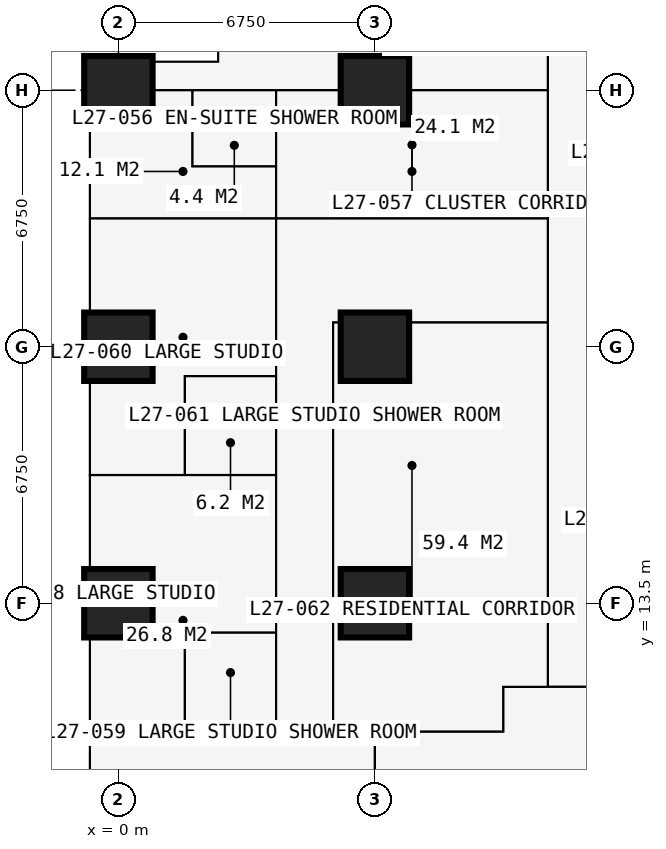
"""IFC4 building model, lengths in metres.
Left out: names, types, materials, properties, quantities, classifications, styles, units other than length and angle.
Written with IfcOpenShell. Run it as: python <this file> out.ifc"""

import sys

from ifc_helpers import new_model, si_unit, direction, frame, frame_2d, origin, origin_2d, place, context, subcontext, project, spatial, rectangle, extrude, element, fill, save


model = new_model("IFC4")
c1 = context("Model", 3, precision=1e-05, world=origin(), true_north=direction((0.0, 1.0)))
c2 = subcontext(c1, "Body", "Model", "MODEL_VIEW")
j1 = project(units=[si_unit("LENGTHUNIT", "METRE"), si_unit("PLANEANGLEUNIT", "RADIAN")], contexts=[c1])
p1 = place(None, origin())
s1 = spatial("IfcSite", under=j1, at=p1, CompositionType="ELEMENT")
p2 = place(p1, origin())
s2 = spatial("IfcBuilding", under=s1, at=p2, CompositionType="ELEMENT")
p3 = place(p2, frame((0.0, 0.0, 101.7)))
s3 = spatial("IfcBuildingStorey", under=s2, at=p3, CompositionType="ELEMENT", Elevation=101.7)
for number, where, z_axis, x_axis in (
    (1, (0.0, 13.5, 0.0), (0.0, 0.0, 1.0), (1.0, 0.0, 0.0)),
    (2, (0.0, 20.25, 0.0), (0.0, 0.0, 1.0), (1.0, 0.0, 0.0)),
    (3, (0.0, 27.0, 0.0), (0.0, 0.0, 1.0), (1.0, 0.0, 0.0)),
    (4, (6.75, 13.5, 0.0), (0.0, 0.0, 1.0), (1.0, 0.0, 0.0)),
    (5, (6.75, 20.25, 0.0), (0.0, 0.0, 1.0), (1.0, 0.0, 0.0)),
    (6, (6.75, 27.0, 0.0), (0.0, 0.0, 1.0), (1.0, 0.0, 0.0)),
):
    element("IfcColumn", number, at=place(p3, frame(where, z_axis=z_axis, x_axis=x_axis)), inside=s3, PredefinedType="COLUMN", context=c2, shape_type="SweptSolid", body=[
        extrude(rectangle(XDim=1.8, YDim=1.8, at=origin_2d()), origin(), (0.0, 0.0, 1.0), 3.6),
    ])
p4 = place(p3, frame((2.625, 31.125, 0.0), z_axis=(0.0, 0.0, 1.0), x_axis=(0.0, -1.0, 0.0)))
e7 = element("IfcWall", 7, at=p4, inside=s3, PredefinedType="SOLIDWALL", context=c2, shape_type="SweptSolid", body=[
    extrude(rectangle(XDim=3.375, YDim=0.3, at=frame_2d((1.688, 0.0))), origin(), (0.0, 0.0, 1.0), 3.375),
])
p5 = place(p4, frame((0.788, 0.0, 0.6)))
e8 = element("IfcOpeningElement", 8, at=p5, cuts=e7, PredefinedType="OPENING", context=c2, shape_type="SweptSolid", body=[
    extrude(rectangle(XDim=1.8, YDim=2.1, at=frame_2d((0.9, 1.05))), frame((0.0, 0.16, 0.0), z_axis=(0.0, -1.0, 0.0), x_axis=(1.0, 0.0, 0.0)), (0.0, 0.0, 1.0), 0.32),
])
p6 = place(p3, frame((2.625, 27.75, 0.0), z_axis=(0.0, 0.0, 1.0), x_axis=(-1.0, 0.0, 0.0)))
e9 = element("IfcWall", 9, at=p6, inside=s3, PredefinedType="SOLIDWALL", context=c2, shape_type="SweptSolid", body=[
    extrude(rectangle(XDim=3.375, YDim=0.3, at=frame_2d((1.688, 0.0))), origin(), (0.0, 0.0, 1.0), 3.375),
])
p7 = place(p6, frame((0.343, 0.0, 0.9)))
e10 = element("IfcOpeningElement", 10, at=p7, cuts=e9, PredefinedType="OPENING", context=c2, shape_type="SweptSolid", body=[
    extrude(rectangle(XDim=1.2, YDim=1.8, at=frame_2d((0.6, 0.9))), frame((0.0, 0.16, 0.0), z_axis=(0.0, -1.0, 0.0), x_axis=(1.0, 0.0, 0.0)), (0.0, 0.0, 1.0), 0.32),
])
p8 = place(p3, frame((-0.75, 13.5, 0.0), z_axis=(0.0, 0.0, 1.0), x_axis=(0.0, 1.0, 0.0)))
e11 = element("IfcWall", 11, at=p8, inside=s3, PredefinedType="SOLIDWALL", context=c2, shape_type="SweptSolid", body=[
    extrude(rectangle(XDim=6.75, YDim=0.15, at=frame_2d((3.375, 0.0))), origin(), (0.0, 0.0, 1.0), 3.375),
])
p9 = place(p8, frame((0.962, 0.0, 0.0)))
e12 = element("IfcOpeningElement", 12, at=p9, cuts=e11, PredefinedType="OPENING", context=c2, shape_type="SweptSolid", body=[
    extrude(rectangle(XDim=1.0, YDim=2.2, at=frame_2d((0.5, 1.1))), frame((0.0, 0.085, 0.0), z_axis=(0.0, -1.0, 0.0), x_axis=(1.0, 0.0, 0.0)), (0.0, 0.0, 1.0), 0.17),
])
p10 = place(p8, frame((2.025, 0.0, 0.9)))
e13 = element("IfcOpeningElement", 13, at=p10, cuts=e11, PredefinedType="OPENING", context=c2, shape_type="SweptSolid", body=[
    extrude(rectangle(XDim=1.2, YDim=1.8, at=frame_2d((0.6, 0.9))), frame((0.0, 0.085, 0.0), z_axis=(0.0, -1.0, 0.0), x_axis=(1.0, 0.0, 0.0)), (0.0, 0.0, 1.0), 0.17),
])
p11 = place(p8, frame((4.788, 0.0, 0.0)))
e14 = element("IfcOpeningElement", 14, at=p11, cuts=e11, PredefinedType="OPENING", context=c2, shape_type="SweptSolid", body=[
    extrude(rectangle(XDim=1.0, YDim=2.2, at=frame_2d((0.5, 1.1))), frame((0.0, 0.085, 0.0), z_axis=(0.0, -1.0, 0.0), x_axis=(1.0, 0.0, 0.0)), (0.0, 0.0, 1.0), 0.17),
])
p12 = place(p8, frame((3.525, 0.0, 0.9)))
e15 = element("IfcOpeningElement", 15, at=p12, cuts=e11, PredefinedType="OPENING", context=c2, shape_type="SweptSolid", body=[
    extrude(rectangle(XDim=1.2, YDim=1.8, at=frame_2d((0.6, 0.9))), frame((0.0, 0.085, 0.0), z_axis=(0.0, -1.0, 0.0), x_axis=(1.0, 0.0, 0.0)), (0.0, 0.0, 1.0), 0.17),
])
p13 = place(p3, frame((-0.85, 16.875, 0.0), z_axis=(0.0, 0.0, 1.0), x_axis=(-1.0, 0.0, 0.0)))
e16 = element("IfcWall", 16, at=p13, inside=s3, PredefinedType="USERDEFINED", context=c2, shape_type="SweptSolid", body=[
    extrude(rectangle(XDim=2.2, YDim=1.0, at=frame_2d((1.1, 0.0))), origin(), (0.0, 0.0, 1.0), 0.9),
])
p14 = place(p3, frame((-0.734, 10.125, 0.0), z_axis=(0.0, 0.0, 1.0), x_axis=(1.0, 0.0, 0.0)))
e17 = element("IfcWall", 17, at=p14, inside=s3, PredefinedType="PARTITIONING", context=c2, shape_type="SweptSolid", body=[
    extrude(rectangle(XDim=10.859, YDim=0.15, at=frame_2d((5.429, 0.0))), origin(), (0.0, 0.0, 1.0), 3.375),
])
p15 = place(p3, frame((-0.734, 16.875, 0.0), z_axis=(0.0, 0.0, 1.0), x_axis=(1.0, 0.0, 0.0)))
e18 = element("IfcWall", 18, at=p15, inside=s3, PredefinedType="PARTITIONING", context=c2, shape_type="SweptSolid", body=[
    extrude(rectangle(XDim=4.884, YDim=0.175, at=frame_2d((2.442, 0.0))), origin(), (0.0, 0.0, 1.0), 3.375),
])
p16 = place(p15, frame((3.234, 0.0, 0.0)))
e19 = element("IfcOpeningElement", 19, at=p16, cuts=e18, PredefinedType="OPENING", context=c2, shape_type="SweptSolid", body=[
    extrude(rectangle(XDim=0.9, YDim=2.2, at=frame_2d((0.45, 1.1))), frame((0.0, 0.097, 0.0), z_axis=(0.0, -1.0, 0.0), x_axis=(1.0, 0.0, 0.0)), (0.0, 0.0, 1.0), 0.195),
])
p17 = place(p3, frame((-0.734, 23.625, 0.0), z_axis=(0.0, 0.0, 1.0), x_axis=(1.0, 0.0, 0.0)))
e20 = element("IfcWall", 20, at=p17, inside=s3, PredefinedType="PARTITIONING", context=c2, shape_type="SweptSolid", body=[
    extrude(rectangle(XDim=12.034, YDim=0.15, at=frame_2d((6.017, 0.0))), origin(), (0.0, 0.0, 1.0), 3.375),
])
p18 = place(p3, frame((-0.734, 27.0, 0.0), z_axis=(0.0, 0.0, 1.0), x_axis=(1.0, 0.0, 0.0)))
e21 = element("IfcWall", 21, at=p18, inside=s3, PredefinedType="PARTITIONING", context=c2, shape_type="SweptSolid", body=[
    extrude(rectangle(XDim=12.034, YDim=0.15, at=frame_2d((6.017, 0.0))), origin(), (0.0, 0.0, 1.0), 2.806),
])
p19 = place(p18, frame((8.434, 0.0, 0.0)))
e22 = element("IfcOpeningElement", 22, at=p19, cuts=e21, PredefinedType="OPENING", context=c2, shape_type="SweptSolid", body=[
    extrude(rectangle(XDim=1.0, YDim=2.2, at=frame_2d((0.5, 1.1))), frame((0.0, 0.085, 0.0), z_axis=(0.0, -1.0, 0.0), x_axis=(1.0, 0.0, 0.0)), (0.0, 0.0, 1.0), 0.17),
])
p20 = place(p3, frame((1.75, 10.125, 0.0), z_axis=(0.0, 0.0, 1.0), x_axis=(0.0, 1.0, 0.0)))
e23 = element("IfcWall", 23, at=p20, inside=s3, PredefinedType="PARTITIONING", context=c2, shape_type="SweptSolid", body=[
    extrude(rectangle(XDim=2.6, YDim=0.1, at=frame_2d((1.3, 0.0))), origin(), (0.0, 0.0, 1.0), 3.375),
])
p21 = place(p20, frame((0.85, 0.0, 0.0)))
e24 = element("IfcOpeningElement", 24, at=p21, cuts=e23, PredefinedType="OPENING", context=c2, shape_type="SweptSolid", body=[
    extrude(rectangle(XDim=0.9, YDim=2.2, at=frame_2d((0.45, 1.1))), frame((0.0, 0.06, 0.0), z_axis=(0.0, -1.0, 0.0), x_axis=(1.0, 0.0, 0.0)), (0.0, 0.0, 1.0), 0.12),
])
p22 = place(p3, frame((1.75, 12.725, 0.0), z_axis=(0.0, 0.0, 1.0), x_axis=(1.0, 0.0, 0.0)))
e25 = element("IfcWall", 25, at=p22, inside=s3, PredefinedType="PARTITIONING", context=c2, shape_type="SweptSolid", body=[
    extrude(rectangle(XDim=2.4, YDim=0.1, at=frame_2d((1.2, 0.0))), origin(), (0.0, 0.0, 1.0), 3.375),
])
p23 = place(p3, frame((1.75, 16.875, 0.0), z_axis=(0.0, 0.0, 1.0), x_axis=(0.0, 1.0, 0.0)))
e26 = element("IfcWall", 26, at=p23, inside=s3, PredefinedType="PARTITIONING", context=c2, shape_type="SweptSolid", body=[
    extrude(rectangle(XDim=2.6, YDim=0.1, at=frame_2d((1.3, 0.0))), origin(), (0.0, 0.0, 1.0), 3.375),
])
p24 = place(p3, frame((1.75, 19.475, 0.0), z_axis=(0.0, 0.0, 1.0), x_axis=(1.0, 0.0, 0.0)))
e27 = element("IfcWall", 27, at=p24, inside=s3, PredefinedType="PARTITIONING", context=c2, shape_type="SweptSolid", body=[
    extrude(rectangle(XDim=2.4, YDim=0.1, at=frame_2d((1.2, 0.0))), origin(), (0.0, 0.0, 1.0), 3.375),
])
p25 = place(p3, frame((1.95, 25.0, 0.0), z_axis=(0.0, 0.0, 1.0), x_axis=(0.0, 1.0, 0.0)))
e28 = element("IfcWall", 28, at=p25, inside=s3, PredefinedType="PARTITIONING", context=c2, shape_type="SweptSolid", body=[
    extrude(rectangle(XDim=2.0, YDim=0.1, at=frame_2d((1.0, 0.0))), origin(), (0.0, 0.0, 1.0), 3.375),
])
p26 = place(p3, frame((1.95, 25.0, 0.0), z_axis=(0.0, 0.0, 1.0), x_axis=(1.0, 0.0, 0.0)))
e29 = element("IfcWall", 29, at=p26, inside=s3, PredefinedType="PARTITIONING", context=c2, shape_type="SweptSolid", body=[
    extrude(rectangle(XDim=2.2, YDim=0.1, at=frame_2d((1.1, 0.0))), origin(), (0.0, 0.0, 1.0), 3.375),
])
p27 = place(p26, frame((0.65, 0.0, 0.0)))
e30 = element("IfcOpeningElement", 30, at=p27, cuts=e29, PredefinedType="OPENING", context=c2, shape_type="SweptSolid", body=[
    extrude(rectangle(XDim=0.9, YDim=2.2, at=frame_2d((0.45, 1.1))), frame((0.0, 0.06, 0.0), z_axis=(0.0, -1.0, 0.0), x_axis=(1.0, 0.0, 0.0)), (0.0, 0.0, 1.0), 0.12),
])
p28 = place(p3, frame((4.15, 10.125, 0.0), z_axis=(0.0, 0.0, 1.0), x_axis=(0.0, 1.0, 0.0)))
e31 = element("IfcWall", 31, at=p28, inside=s3, PredefinedType="PARTITIONING", context=c2, shape_type="SweptSolid", body=[
    extrude(rectangle(XDim=16.875, YDim=0.1, at=frame_2d((8.438, 0.0))), origin(), (0.0, 0.0, 1.0), 3.375),
])
p29 = place(p28, frame((13.7, 0.0, 0.0)))
e32 = element("IfcOpeningElement", 32, at=p29, cuts=e31, PredefinedType="OPENING", context=c2, shape_type="SweptSolid", body=[
    extrude(rectangle(XDim=0.95, YDim=2.2, at=frame_2d((0.475, 1.1))), frame((0.0, 0.06, 0.0), z_axis=(0.0, -1.0, 0.0), x_axis=(1.0, 0.0, 0.0)), (0.0, 0.0, 1.0), 0.12),
])
p30 = place(p28, frame((4.2, 0.0, 0.0)))
e33 = element("IfcOpeningElement", 33, at=p30, cuts=e31, PredefinedType="OPENING", context=c2, shape_type="SweptSolid", body=[
    extrude(rectangle(XDim=0.95, YDim=2.2, at=frame_2d((0.475, 1.1))), frame((0.0, 0.06, 0.0), z_axis=(0.0, -1.0, 0.0), x_axis=(1.0, 0.0, 0.0)), (0.0, 0.0, 1.0), 0.12),
])
p31 = place(p28, frame((10.95, 0.0, 0.0)))
e34 = element("IfcOpeningElement", 34, at=p31, cuts=e31, PredefinedType="OPENING", context=c2, shape_type="SweptSolid", body=[
    extrude(rectangle(XDim=0.95, YDim=2.2, at=frame_2d((0.475, 1.1))), frame((0.0, 0.06, 0.0), z_axis=(0.0, -1.0, 0.0), x_axis=(1.0, 0.0, 0.0)), (0.0, 0.0, 1.0), 0.12),
])
p32 = place(p3, frame((5.65, 10.125, 0.0), z_axis=(0.0, 0.0, 1.0), x_axis=(0.0, 1.0, 0.0)))
e35 = element("IfcWall", 35, at=p32, inside=s3, PredefinedType="PARTITIONING", context=c2, shape_type="SweptSolid", body=[
    extrude(rectangle(XDim=10.762, YDim=0.15, at=frame_2d((5.381, 0.0))), origin(), (0.0, 0.0, 1.0), 3.375),
])
p33 = place(p32, frame((4.9, 0.0, 0.0)))
e36 = element("IfcOpeningElement", 36, at=p33, cuts=e35, PredefinedType="OPENING", context=c2, shape_type="SweptSolid", body=[
    extrude(rectangle(XDim=0.95, YDim=2.2, at=frame_2d((0.475, 1.1))), frame((0.0, 0.085, 0.0), z_axis=(0.0, -1.0, 0.0), x_axis=(1.0, 0.0, 0.0)), (0.0, 0.0, 1.0), 0.17),
])
p34 = place(p3, frame((5.65, 20.887, 0.0), z_axis=(0.0, 0.0, 1.0), x_axis=(1.0, 0.0, 0.0)))
e37 = element("IfcWall", 37, at=p34, inside=s3, PredefinedType="PARTITIONING", context=c2, shape_type="SweptSolid", body=[
    extrude(rectangle(XDim=5.65, YDim=0.15, at=frame_2d((2.825, 0.0))), origin(), (0.0, 0.0, 1.0), 3.375),
])
p35 = place(p3, frame((6.75, 4.15, 0.0), z_axis=(0.0, 0.0, 1.0), x_axis=(0.0, 1.0, 0.0)))
e38 = element("IfcWall", 38, at=p35, inside=s3, PredefinedType="PARTITIONING", context=c2, shape_type="SweptSolid", body=[
    extrude(rectangle(XDim=5.975, YDim=0.15, at=frame_2d((2.988, 0.0))), origin(), (0.0, 0.0, 1.0), 2.877),
])
p36 = place(p3, frame((10.125, 10.125, 0.0), z_axis=(0.0, 0.0, 1.0), x_axis=(0.0, 1.0, 0.0)))
e39 = element("IfcWall", 39, at=p36, inside=s3, PredefinedType="PARTITIONING", context=c2, shape_type="SweptSolid", body=[
    extrude(rectangle(XDim=1.175, YDim=0.15, at=frame_2d((0.587, 0.0))), origin(), (0.0, 0.0, 1.0), 3.375),
])
p37 = place(p3, frame((10.125, 11.3, 0.0), z_axis=(0.0, 0.0, 1.0), x_axis=(1.0, 0.0, 0.0)))
e40 = element("IfcWall", 40, at=p37, inside=s3, PredefinedType="PARTITIONING", context=c2, shape_type="SweptSolid", body=[
    extrude(rectangle(XDim=20.675, YDim=0.15, at=frame_2d((10.337, 0.0))), origin(), (0.0, 0.0, 1.0), 3.375),
])
p38 = place(p37, frame((8.375, 0.0, 0.0)))
e41 = element("IfcOpeningElement", 41, at=p38, cuts=e40, PredefinedType="OPENING", context=c2, shape_type="SweptSolid", body=[
    extrude(rectangle(XDim=1.0, YDim=2.2, at=frame_2d((0.5, 1.1))), frame((0.0, 0.085, 0.0), z_axis=(0.0, -1.0, 0.0), x_axis=(1.0, 0.0, 0.0)), (0.0, 0.0, 1.0), 0.17),
])
p39 = place(p37, frame((10.975, 0.0, 0.0)))
e42 = element("IfcOpeningElement", 42, at=p39, cuts=e40, PredefinedType="OPENING", context=c2, shape_type="SweptSolid", body=[
    extrude(rectangle(XDim=1.0, YDim=2.2, at=frame_2d((0.5, 1.1))), frame((0.0, 0.085, 0.0), z_axis=(0.0, -1.0, 0.0), x_axis=(1.0, 0.0, 0.0)), (0.0, 0.0, 1.0), 0.17),
])
p40 = place(p37, frame((3.925, 0.0, 0.0)))
e43 = element("IfcOpeningElement", 43, at=p40, cuts=e40, PredefinedType="OPENING", context=c2, shape_type="SweptSolid", body=[
    extrude(rectangle(XDim=0.95, YDim=2.2, at=frame_2d((0.475, 1.1))), frame((0.0, 0.085, 0.0), z_axis=(0.0, -1.0, 0.0), x_axis=(1.0, 0.0, 0.0)), (0.0, 0.0, 1.0), 0.17),
])
p41 = place(p3, frame((11.3, 11.3, 0.0), z_axis=(0.0, 0.0, 1.0), x_axis=(0.0, 1.0, 0.0)))
e44 = element("IfcWall", 44, at=p41, inside=s3, PredefinedType="PARTITIONING", context=c2, shape_type="SweptSolid", body=[
    extrude(rectangle(XDim=19.3, YDim=0.15, at=frame_2d((9.65, 0.0))), origin(), (0.0, 0.0, 1.0), 3.375),
])
p42 = place(p41, frame((13.525, 0.0, 0.0)))
e45 = element("IfcOpeningElement", 45, at=p42, cuts=e44, PredefinedType="OPENING", context=c2, shape_type="SweptSolid", body=[
    extrude(rectangle(XDim=1.0, YDim=2.2, at=frame_2d((0.5, 1.1))), frame((0.0, 0.085, 0.0), z_axis=(0.0, -1.0, 0.0), x_axis=(1.0, 0.0, 0.0)), (0.0, 0.0, 1.0), 0.17),
])
p43 = place(p41, frame((10.438, 0.0, 0.0)))
e46 = element("IfcOpeningElement", 46, at=p43, cuts=e44, PredefinedType="OPENING", context=c2, shape_type="SweptSolid", body=[
    extrude(rectangle(XDim=1.0, YDim=2.2, at=frame_2d((0.5, 1.1))), frame((0.0, 0.085, 0.0), z_axis=(0.0, -1.0, 0.0), x_axis=(1.0, 0.0, 0.0)), (0.0, 0.0, 1.0), 0.17),
])
p44 = place(p7, origin())
e47 = element("IfcWindow", 47, at=p44, inside=s3, PartitioningType="SINGLE_PANEL", PredefinedType="WINDOW", context=c2, shape_type="SweptSolid", body=[
    extrude(rectangle(XDim=1.2, YDim=1.8, at=frame_2d((0.6, 0.9))), frame((0.0, 0.03, 0.0), z_axis=(0.0, -1.0, 0.0), x_axis=(1.0, 0.0, 0.0)), (0.0, 0.0, 1.0), 0.06),
])
fill(e10, e47)
p45 = place(p9, origin())
e48 = element("IfcDoor", 48, at=p45, inside=s3, OperationType="SINGLE_SWING_LEFT", PredefinedType="DOOR", context=c2, shape_type="SweptSolid", body=[
    extrude(rectangle(XDim=1.0, YDim=2.2, at=frame_2d((0.5, 1.1))), frame((0.0, 0.025, 0.0), z_axis=(0.0, -1.0, 0.0), x_axis=(1.0, 0.0, 0.0)), (0.0, 0.0, 1.0), 0.05),
])
fill(e12, e48)
p46 = place(p10, origin())
e49 = element("IfcWindow", 49, at=p46, inside=s3, PartitioningType="SINGLE_PANEL", PredefinedType="WINDOW", context=c2, shape_type="SweptSolid", body=[
    extrude(rectangle(XDim=1.2, YDim=1.8, at=frame_2d((0.6, 0.9))), frame((0.0, 0.03, 0.0), z_axis=(0.0, -1.0, 0.0), x_axis=(1.0, 0.0, 0.0)), (0.0, 0.0, 1.0), 0.06),
])
fill(e13, e49)
p47 = place(p11, origin())
e50 = element("IfcDoor", 50, at=p47, inside=s3, OperationType="SINGLE_SWING_RIGHT", PredefinedType="DOOR", context=c2, shape_type="SweptSolid", body=[
    extrude(rectangle(XDim=1.0, YDim=2.2, at=frame_2d((0.5, 1.1))), frame((0.0, 0.025, 0.0), z_axis=(0.0, -1.0, 0.0), x_axis=(1.0, 0.0, 0.0)), (0.0, 0.0, 1.0), 0.05),
])
fill(e14, e50)
p48 = place(p12, origin())
e51 = element("IfcWindow", 51, at=p48, inside=s3, PartitioningType="SINGLE_PANEL", PredefinedType="WINDOW", context=c2, shape_type="SweptSolid", body=[
    extrude(rectangle(XDim=1.2, YDim=1.8, at=frame_2d((0.6, 0.9))), frame((0.0, 0.03, 0.0), z_axis=(0.0, -1.0, 0.0), x_axis=(1.0, 0.0, 0.0)), (0.0, 0.0, 1.0), 0.06),
])
fill(e15, e51)
p49 = place(p19, origin())
e52 = element("IfcDoor", 52, at=p49, inside=s3, OperationType="SINGLE_SWING_LEFT", PredefinedType="DOOR", context=c2, shape_type="SweptSolid", body=[
    extrude(rectangle(XDim=1.0, YDim=2.2, at=frame_2d((0.5, 1.1))), frame((0.0, 0.025, 0.0), z_axis=(0.0, -1.0, 0.0), x_axis=(1.0, 0.0, 0.0)), (0.0, 0.0, 1.0), 0.05),
])
fill(e22, e52)
p50 = place(p29, origin())
e53 = element("IfcDoor", 53, at=p50, inside=s3, OperationType="SINGLE_SWING_LEFT", PredefinedType="DOOR", context=c2, shape_type="SweptSolid", body=[
    extrude(rectangle(XDim=0.95, YDim=2.2, at=frame_2d((0.475, 1.1))), frame((0.0, 0.025, 0.0), z_axis=(0.0, -1.0, 0.0), x_axis=(1.0, 0.0, 0.0)), (0.0, 0.0, 1.0), 0.05),
])
fill(e32, e53)
p51 = place(p27, origin())
e54 = element("IfcDoor", 54, at=p51, inside=s3, OperationType="SINGLE_SWING_RIGHT", PredefinedType="DOOR", context=c2, shape_type="SweptSolid", body=[
    extrude(rectangle(XDim=0.9, YDim=2.2, at=frame_2d((0.45, 1.1))), frame((0.0, 0.025, 0.0), z_axis=(0.0, -1.0, 0.0), x_axis=(1.0, 0.0, 0.0)), (0.0, 0.0, 1.0), 0.05),
])
fill(e30, e54)
p52 = place(p42, origin())
e55 = element("IfcDoor", 55, at=p52, inside=s3, OperationType="SINGLE_SWING_LEFT", PredefinedType="DOOR", context=c2, shape_type="SweptSolid", body=[
    extrude(rectangle(XDim=1.0, YDim=2.2, at=frame_2d((0.5, 1.1))), frame((0.0, 0.025, 0.0), z_axis=(0.0, -1.0, 0.0), x_axis=(1.0, 0.0, 0.0)), (0.0, 0.0, 1.0), 0.05),
])
fill(e45, e55)
p53 = place(p30, origin())
e56 = element("IfcDoor", 56, at=p53, inside=s3, OperationType="SINGLE_SWING_LEFT", PredefinedType="DOOR", context=c2, shape_type="SweptSolid", body=[
    extrude(rectangle(XDim=0.95, YDim=2.2, at=frame_2d((0.475, 1.1))), frame((0.0, 0.025, 0.0), z_axis=(0.0, -1.0, 0.0), x_axis=(1.0, 0.0, 0.0)), (0.0, 0.0, 1.0), 0.05),
])
fill(e33, e56)
p54 = place(p21, origin())
e57 = element("IfcDoor", 57, at=p54, inside=s3, OperationType="SINGLE_SWING_RIGHT", PredefinedType="DOOR", context=c2, shape_type="SweptSolid", body=[
    extrude(rectangle(XDim=0.9, YDim=2.2, at=frame_2d((0.45, 1.1))), frame((0.0, 0.025, 0.0), z_axis=(0.0, -1.0, 0.0), x_axis=(1.0, 0.0, 0.0)), (0.0, 0.0, 1.0), 0.05),
])
fill(e24, e57)
p55 = place(p31, origin())
e58 = element("IfcDoor", 58, at=p55, inside=s3, OperationType="SINGLE_SWING_LEFT", PredefinedType="DOOR", context=c2, shape_type="SweptSolid", body=[
    extrude(rectangle(XDim=0.95, YDim=2.2, at=frame_2d((0.475, 1.1))), frame((0.0, 0.025, 0.0), z_axis=(0.0, -1.0, 0.0), x_axis=(1.0, 0.0, 0.0)), (0.0, 0.0, 1.0), 0.05),
])
fill(e34, e58)
p56 = place(p16, origin())
e59 = element("IfcDoor", 59, at=p56, inside=s3, OperationType="SINGLE_SWING_RIGHT", PredefinedType="DOOR", context=c2, shape_type="SweptSolid", body=[
    extrude(rectangle(XDim=0.9, YDim=2.2, at=frame_2d((0.45, 1.1))), frame((0.0, 0.025, 0.0), z_axis=(0.0, -1.0, 0.0), x_axis=(1.0, 0.0, 0.0)), (0.0, 0.0, 1.0), 0.05),
])
fill(e19, e59)
p57 = place(p43, origin())
e60 = element("IfcDoor", 60, at=p57, inside=s3, OperationType="SINGLE_SWING_LEFT", PredefinedType="DOOR", context=c2, shape_type="SweptSolid", body=[
    extrude(rectangle(XDim=1.0, YDim=2.2, at=frame_2d((0.5, 1.1))), frame((0.0, 0.025, 0.0), z_axis=(0.0, -1.0, 0.0), x_axis=(1.0, 0.0, 0.0)), (0.0, 0.0, 1.0), 0.05),
])
fill(e46, e60)
p58 = place(p33, origin())
e61 = element("IfcDoor", 61, at=p58, inside=s3, OperationType="SINGLE_SWING_LEFT", PredefinedType="DOOR", context=c2, shape_type="SweptSolid", body=[
    extrude(rectangle(XDim=0.95, YDim=2.2, at=frame_2d((0.475, 1.1))), frame((0.0, 0.025, 0.0), z_axis=(0.0, -1.0, 0.0), x_axis=(1.0, 0.0, 0.0)), (0.0, 0.0, 1.0), 0.05),
])
fill(e36, e61)
save(model, sys.argv[1])
